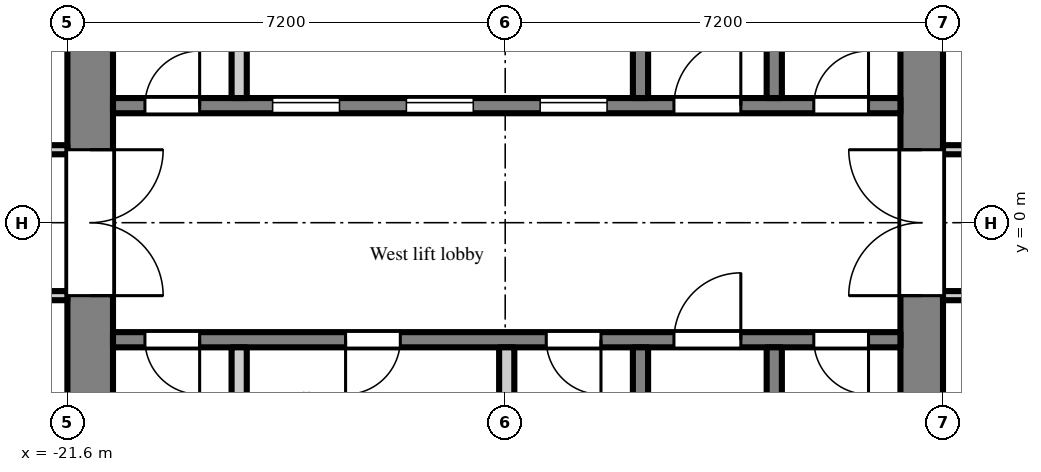
"""IFC4 building model, lengths in metres.
Left out: names, types, materials, properties, quantities, classifications, styles, units other than length and angle.
Written with IfcOpenShell. Run it as: python <this file> out.ifc"""

import sys

from ifc_helpers import new_model, si_unit, direction, frame, frame_2d, origin, place, context, subcontext, project, spatial, polyline, rectangle, outline, extrude, element, fill, save


model = new_model("IFC4")
c1 = context("Model", 3, precision=1e-05, world=origin(), true_north=direction((0.0, 1.0)))
c2 = subcontext(c1, "Body", "Model", "MODEL_VIEW")
j1 = project(units=[si_unit("LENGTHUNIT", "METRE"), si_unit("PLANEANGLEUNIT", "RADIAN")], contexts=[c1])
p1 = place(None, origin())
s1 = spatial("IfcSite", under=j1, at=p1, CompositionType="ELEMENT")
p2 = place(p1, origin())
s2 = spatial("IfcBuilding", under=s1, at=p2, CompositionType="ELEMENT")
p3 = place(p2, frame((0.0, 0.0, 194.7)))
s3 = spatial("IfcBuildingStorey", under=s2, at=p3, CompositionType="ELEMENT", Elevation=194.7)
p4 = place(p3, frame((-7.55, -7.2, 0.0), z_axis=(0.0, 0.0, 1.0), x_axis=(0.0, 1.0, 0.0)))
e1 = element("IfcWall", 1, at=p4, inside=s3, PredefinedType="SHEAR", context=c2, shape_type="SweptSolid", body=[
    extrude(rectangle(XDim=14.4, YDim=0.7, at=frame_2d((7.2, 0.0))), origin(), (0.0, 0.0, 1.0), 3.8),
])
p5 = place(p4, frame((6.0, 0.0, 0.0)))
e2 = element("IfcOpeningElement", 2, at=p5, cuts=e1, PredefinedType="OPENING", context=c2, shape_type="SweptSolid", body=[
    extrude(rectangle(XDim=2.4, YDim=2.2, at=frame_2d((1.2, 1.1))), frame((0.0, 0.36, 0.0), z_axis=(0.0, -1.0, 0.0), x_axis=(1.0, 0.0, 0.0)), (0.0, 0.0, 1.0), 0.72),
])
p6 = place(p3, frame((-21.225, -7.2, 0.0), z_axis=(0.0, 0.0, 1.0), x_axis=(0.0, 1.0, 0.0)))
e3 = element("IfcWall", 3, at=p6, inside=s3, PredefinedType="SHEAR", context=c2, shape_type="SweptSolid", body=[
    extrude(rectangle(XDim=14.4, YDim=0.75, at=frame_2d((7.2, 0.0))), origin(), (0.0, 0.0, 1.0), 3.8),
])
p7 = place(p6, frame((6.0, 0.0, 0.0)))
e4 = element("IfcOpeningElement", 4, at=p7, cuts=e3, PredefinedType="OPENING", context=c2, shape_type="SweptSolid", body=[
    extrude(rectangle(XDim=2.4, YDim=2.2, at=frame_2d((1.2, 1.1))), frame((0.0, 0.385, 0.0), z_axis=(0.0, -1.0, 0.0), x_axis=(1.0, 0.0, 0.0)), (0.0, 0.0, 1.0), 0.77),
])
p8 = place(p3, frame((-7.9, 1.925, 0.0), z_axis=(0.0, 0.0, 1.0), x_axis=(-1.0, 0.0, 0.0)))
e5 = element("IfcWall", 5, at=p8, inside=s3, PredefinedType="SHEAR", context=c2, shape_type="SweptSolid", body=[
    extrude(rectangle(XDim=12.95, YDim=0.25, at=frame_2d((6.475, 0.0))), origin(), (0.0, 0.0, 1.0), 3.8),
])
p9 = place(p8, frame((4.825, 0.0, 0.0)))
e6 = element("IfcOpeningElement", 6, at=p9, cuts=e5, PredefinedType="OPENING", context=c2, shape_type="SweptSolid", body=[
    extrude(rectangle(XDim=1.1, YDim=2.1, at=frame_2d((0.55, 1.05))), frame((0.0, 0.135, 0.0), z_axis=(0.0, -1.0, 0.0), x_axis=(1.0, 0.0, 0.0)), (0.0, 0.0, 1.0), 0.27),
])
p10 = place(p8, frame((7.025, 0.0, 0.0)))
e7 = element("IfcOpeningElement", 7, at=p10, cuts=e5, PredefinedType="OPENING", context=c2, shape_type="SweptSolid", body=[
    extrude(rectangle(XDim=1.1, YDim=2.1, at=frame_2d((0.55, 1.05))), frame((0.0, 0.135, 0.0), z_axis=(0.0, -1.0, 0.0), x_axis=(1.0, 0.0, 0.0)), (0.0, 0.0, 1.0), 0.27),
])
p11 = place(p8, frame((9.225, 0.0, 0.0)))
e8 = element("IfcOpeningElement", 8, at=p11, cuts=e5, PredefinedType="OPENING", context=c2, shape_type="SweptSolid", body=[
    extrude(rectangle(XDim=1.1, YDim=2.1, at=frame_2d((0.55, 1.05))), frame((0.0, 0.135, 0.0), z_axis=(0.0, -1.0, 0.0), x_axis=(1.0, 0.0, 0.0)), (0.0, 0.0, 1.0), 0.27),
])
p12 = place(p8, frame((0.525, 0.0, 0.0)))
e9 = element("IfcOpeningElement", 9, at=p12, cuts=e5, PredefinedType="OPENING", context=c2, shape_type="SweptSolid", body=[
    extrude(rectangle(XDim=0.9, YDim=2.1, at=frame_2d((0.45, 1.05))), frame((0.0, 0.135, 0.0), z_axis=(0.0, -1.0, 0.0), x_axis=(1.0, 0.0, 0.0)), (0.0, 0.0, 1.0), 0.27),
])
p13 = place(p8, frame((2.625, 0.0, 0.0)))
e10 = element("IfcOpeningElement", 10, at=p13, cuts=e5, PredefinedType="OPENING", context=c2, shape_type="SweptSolid", body=[
    extrude(rectangle(XDim=1.1, YDim=2.1, at=frame_2d((0.55, 1.05))), frame((0.0, 0.135, 0.0), z_axis=(0.0, -1.0, 0.0), x_axis=(1.0, 0.0, 0.0)), (0.0, 0.0, 1.0), 0.27),
])
p14 = place(p8, frame((11.525, 0.0, 0.0)))
e11 = element("IfcOpeningElement", 11, at=p14, cuts=e5, PredefinedType="OPENING", context=c2, shape_type="SweptSolid", body=[
    extrude(rectangle(XDim=0.9, YDim=2.1, at=frame_2d((0.45, 1.05))), frame((0.0, 0.135, 0.0), z_axis=(0.0, -1.0, 0.0), x_axis=(1.0, 0.0, 0.0)), (0.0, 0.0, 1.0), 0.27),
])
p15 = place(p3, frame((-9.975, 2.05, 0.0), z_axis=(0.0, 0.0, 1.0), x_axis=(0.0, 1.0, 0.0)))
e12 = element("IfcWall", 12, at=p15, inside=s3, PredefinedType="SHEAR", context=c2, shape_type="SweptSolid", body=[
    extrude(rectangle(XDim=4.75, YDim=0.25, at=frame_2d((2.375, 0.0))), origin(), (0.0, 0.0, 1.0), 3.8),
])
p16 = place(p15, frame((2.95, 0.0, 0.0)))
e13 = element("IfcOpeningElement", 13, at=p16, cuts=e12, PredefinedType="OPENING", context=c2, shape_type="SweptSolid", body=[
    extrude(rectangle(XDim=1.1, YDim=2.1, at=frame_2d((0.55, 1.05))), frame((0.0, 0.135, 0.0), z_axis=(0.0, -1.0, 0.0), x_axis=(1.0, 0.0, 0.0)), (0.0, 0.0, 1.0), 0.27),
])
p17 = place(p3, frame((-12.175, 2.05, 0.0), z_axis=(0.0, 0.0, 1.0), x_axis=(0.0, 1.0, 0.0)))
e14 = element("IfcWall", 14, at=p17, inside=s3, PredefinedType="SHEAR", context=c2, shape_type="SweptSolid", body=[
    extrude(rectangle(XDim=4.75, YDim=0.25, at=frame_2d((2.375, 0.0))), origin(), (0.0, 0.0, 1.0), 3.8),
])
p18 = place(p17, frame((3.0, 0.0, 0.0)))
e15 = element("IfcOpeningElement", 15, at=p18, cuts=e14, PredefinedType="OPENING", context=c2, shape_type="SweptSolid", body=[
    extrude(rectangle(XDim=1.1, YDim=2.1, at=frame_2d((0.55, 1.05))), frame((0.0, 0.135, 0.0), z_axis=(0.0, -1.0, 0.0), x_axis=(1.0, 0.0, 0.0)), (0.0, 0.0, 1.0), 0.27),
])
p19 = place(p3, frame((-18.775, 2.05, 0.0), z_axis=(0.0, 0.0, 1.0), x_axis=(0.0, 1.0, 0.0)))
e16 = element("IfcWall", 16, at=p19, inside=s3, PredefinedType="PARTITIONING", context=c2, shape_type="SweptSolid", body=[
    extrude(rectangle(XDim=2.1, YDim=0.25, at=frame_2d((1.05, 0.0))), origin(), (0.0, 0.0, 1.0), 3.8),
])
p20 = place(p3, frame((-7.9, -1.925, 0.0), z_axis=(0.0, 0.0, 1.0), x_axis=(-1.0, 0.0, 0.0)))
e17 = element("IfcWall", 17, at=p20, inside=s3, PredefinedType="SHEAR", context=c2, shape_type="SweptSolid", body=[
    extrude(rectangle(XDim=12.95, YDim=0.25, at=frame_2d((6.475, 0.0))), origin(), (0.0, 0.0, 1.0), 3.8),
])
p21 = place(p20, frame((0.525, 0.0, 0.0)))
e18 = element("IfcOpeningElement", 18, at=p21, cuts=e17, PredefinedType="OPENING", context=c2, shape_type="SweptSolid", body=[
    extrude(rectangle(XDim=0.9, YDim=2.1, at=frame_2d((0.45, 1.05))), frame((0.0, 0.135, 0.0), z_axis=(0.0, -1.0, 0.0), x_axis=(1.0, 0.0, 0.0)), (0.0, 0.0, 1.0), 0.27),
])
p22 = place(p20, frame((2.625, 0.0, 0.0)))
e19 = element("IfcOpeningElement", 19, at=p22, cuts=e17, PredefinedType="OPENING", context=c2, shape_type="SweptSolid", body=[
    extrude(rectangle(XDim=1.1, YDim=2.1, at=frame_2d((0.55, 1.05))), frame((0.0, 0.135, 0.0), z_axis=(0.0, -1.0, 0.0), x_axis=(1.0, 0.0, 0.0)), (0.0, 0.0, 1.0), 0.27),
])
p23 = place(p20, frame((4.925, 0.0, 0.0)))
e20 = element("IfcOpeningElement", 20, at=p23, cuts=e17, PredefinedType="OPENING", context=c2, shape_type="SweptSolid", body=[
    extrude(rectangle(XDim=0.9, YDim=2.1, at=frame_2d((0.45, 1.05))), frame((0.0, 0.135, 0.0), z_axis=(0.0, -1.0, 0.0), x_axis=(1.0, 0.0, 0.0)), (0.0, 0.0, 1.0), 0.27),
])
p24 = place(p20, frame((8.225, 0.0, 0.0)))
e21 = element("IfcOpeningElement", 21, at=p24, cuts=e17, PredefinedType="OPENING", context=c2, shape_type="SweptSolid", body=[
    extrude(rectangle(XDim=0.9, YDim=2.1, at=frame_2d((0.45, 1.05))), frame((0.0, 0.135, 0.0), z_axis=(0.0, -1.0, 0.0), x_axis=(1.0, 0.0, 0.0)), (0.0, 0.0, 1.0), 0.27),
])
p25 = place(p20, frame((11.525, 0.0, 0.0)))
e22 = element("IfcOpeningElement", 22, at=p25, cuts=e17, PredefinedType="OPENING", context=c2, shape_type="SweptSolid", body=[
    extrude(rectangle(XDim=0.9, YDim=2.1, at=frame_2d((0.45, 1.05))), frame((0.0, 0.135, 0.0), z_axis=(0.0, -1.0, 0.0), x_axis=(1.0, 0.0, 0.0)), (0.0, 0.0, 1.0), 0.27),
])
p26 = place(p3, frame((-9.975, -2.05, 0.0), z_axis=(0.0, 0.0, 1.0), x_axis=(0.0, -1.0, 0.0)))
e23 = element("IfcWall", 23, at=p26, inside=s3, PredefinedType="SHEAR", context=c2, shape_type="SweptSolid", body=[
    extrude(rectangle(XDim=4.75, YDim=0.25, at=frame_2d((2.375, 0.0))), origin(), (0.0, 0.0, 1.0), 3.8),
])
p27 = place(p26, frame((2.95, 0.0, 0.0)))
e24 = element("IfcOpeningElement", 24, at=p27, cuts=e23, PredefinedType="OPENING", context=c2, shape_type="SweptSolid", body=[
    extrude(rectangle(XDim=1.1, YDim=2.1, at=frame_2d((0.55, 1.05))), frame((0.0, 0.135, 0.0), z_axis=(0.0, -1.0, 0.0), x_axis=(1.0, 0.0, 0.0)), (0.0, 0.0, 1.0), 0.27),
])
p28 = place(p3, frame((-12.175, -2.05, 0.0), z_axis=(0.0, 0.0, 1.0), x_axis=(0.0, -1.0, 0.0)))
e25 = element("IfcWall", 25, at=p28, inside=s3, PredefinedType="SHEAR", context=c2, shape_type="SweptSolid", body=[
    extrude(rectangle(XDim=4.75, YDim=0.25, at=frame_2d((2.375, 0.0))), origin(), (0.0, 0.0, 1.0), 3.8),
])
p29 = place(p28, frame((3.0, 0.0, 0.0)))
e26 = element("IfcOpeningElement", 26, at=p29, cuts=e25, PredefinedType="OPENING", context=c2, shape_type="SweptSolid", body=[
    extrude(rectangle(XDim=1.1, YDim=2.1, at=frame_2d((0.55, 1.05))), frame((0.0, 0.135, 0.0), z_axis=(0.0, -1.0, 0.0), x_axis=(1.0, 0.0, 0.0)), (0.0, 0.0, 1.0), 0.27),
])
for number, where, z_axis, x_axis in (
    (27, (-14.375, -2.05, 0.0), (0.0, 0.0, 1.0), (0.0, -1.0, 0.0)),
    (28, (-18.775, -2.05, 0.0), (0.0, 0.0, 1.0), (0.0, -1.0, 0.0)),
):
    element("IfcWall", number, at=place(p3, frame(where, z_axis=z_axis, x_axis=x_axis)), inside=s3, PredefinedType="PARTITIONING", context=c2, shape_type="SweptSolid", body=[
        extrude(rectangle(XDim=2.1, YDim=0.25, at=frame_2d((1.05, 0.0))), origin(), (0.0, 0.0, 1.0), 3.8),
    ])
p30 = place(p3, frame((-36.5, -1.2, 0.0), z_axis=(0.0, 0.0, 1.0), x_axis=(1.0, 0.0, 0.0)))
e29 = element("IfcWall", 29, at=p30, inside=s3, PredefinedType="PARTITIONING", context=c2, shape_type="SweptSolid", body=[
    extrude(outline(polyline([(0.0, 0.0), (14.9, 0.0), (14.9, 3.8), (6.102, 3.8), (6.1, 3.4), (5.3, 3.4), (5.298, 3.8), (0.0, 3.8), (0.0, 0.0)])), frame((0.0, 0.075, 0.0), z_axis=(0.0, -1.0, 0.0), x_axis=(1.0, 0.0, 0.0)), (0.0, 0.0, 1.0), 0.15),
])
p31 = place(p30, frame((6.8, 0.0, 0.0)))
e30 = element("IfcOpeningElement", 30, at=p31, cuts=e29, PredefinedType="OPENING", context=c2, shape_type="SweptSolid", body=[
    extrude(rectangle(XDim=1.8, YDim=2.1, at=frame_2d((0.9, 1.05))), frame((0.0, 0.085, 0.0), z_axis=(0.0, -1.0, 0.0), x_axis=(1.0, 0.0, 0.0)), (0.0, 0.0, 1.0), 0.17),
])
p32 = place(p30, frame((12.45, 0.0, 0.0)))
e31 = element("IfcOpeningElement", 31, at=p32, cuts=e29, PredefinedType="OPENING", context=c2, shape_type="SweptSolid", body=[
    extrude(rectangle(XDim=1.8, YDim=2.1, at=frame_2d((0.9, 1.05))), frame((0.0, 0.085, 0.0), z_axis=(0.0, -1.0, 0.0), x_axis=(1.0, 0.0, 0.0)), (0.0, 0.0, 1.0), 0.17),
])
p33 = place(p30, frame((1.15, 0.0, 0.0)))
e32 = element("IfcOpeningElement", 32, at=p33, cuts=e29, PredefinedType="OPENING", context=c2, shape_type="SweptSolid", body=[
    extrude(rectangle(XDim=1.8, YDim=2.1, at=frame_2d((0.9, 1.05))), frame((0.0, 0.085, 0.0), z_axis=(0.0, -1.0, 0.0), x_axis=(1.0, 0.0, 0.0)), (0.0, 0.0, 1.0), 0.17),
])
p34 = place(p3, frame((-36.5, 1.2, 0.0), z_axis=(0.0, 0.0, 1.0), x_axis=(1.0, 0.0, 0.0)))
e33 = element("IfcWall", 33, at=p34, inside=s3, PredefinedType="PARTITIONING", context=c2, shape_type="SweptSolid", body=[
    extrude(outline(polyline([(0.0, 0.0), (14.9, 0.0), (14.9, 3.8), (6.102, 3.8), (6.1, 3.4), (5.3, 3.4), (5.298, 3.8), (0.0, 3.8), (0.0, 0.0)])), frame((0.0, 0.075, 0.0), z_axis=(0.0, -1.0, 0.0), x_axis=(1.0, 0.0, 0.0)), (0.0, 0.0, 1.0), 0.15),
])
p35 = place(p34, frame((8.6, 0.0, 0.0)))
e34 = element("IfcOpeningElement", 34, at=p35, cuts=e33, PredefinedType="OPENING", context=c2, shape_type="SweptSolid", body=[
    extrude(rectangle(XDim=1.8, YDim=2.1, at=frame_2d((0.9, 1.05))), frame((0.0, 0.085, 0.0), z_axis=(0.0, -1.0, 0.0), x_axis=(1.0, 0.0, 0.0)), (0.0, 0.0, 1.0), 0.17),
])
p36 = place(p34, frame((12.85, 0.0, 0.0)))
e35 = element("IfcOpeningElement", 35, at=p36, cuts=e33, PredefinedType="OPENING", context=c2, shape_type="SweptSolid", body=[
    extrude(rectangle(XDim=1.2, YDim=2.1, at=frame_2d((0.6, 1.05))), frame((0.0, 0.085, 0.0), z_axis=(0.0, -1.0, 0.0), x_axis=(1.0, 0.0, 0.0)), (0.0, 0.0, 1.0), 0.17),
])
p37 = place(p34, frame((3.25, 0.0, 0.0)))
e36 = element("IfcOpeningElement", 36, at=p37, cuts=e33, PredefinedType="OPENING", context=c2, shape_type="SweptSolid", body=[
    extrude(rectangle(XDim=1.2, YDim=2.1, at=frame_2d((0.6, 1.05))), frame((0.0, 0.085, 0.0), z_axis=(0.0, -1.0, 0.0), x_axis=(1.0, 0.0, 0.0)), (0.0, 0.0, 1.0), 0.17),
])
p38 = place(p3, frame((-7.2, -1.2, 0.0), z_axis=(0.0, 0.0, 1.0), x_axis=(1.0, 0.0, 0.0)))
e37 = element("IfcWall", 37, at=p38, inside=s3, PredefinedType="PARTITIONING", context=c2, shape_type="SweptSolid", body=[
    extrude(rectangle(XDim=5.925, YDim=0.15, at=frame_2d((2.962, 0.0))), origin(), (0.0, 0.0, 1.0), 3.8),
])
p39 = place(p38, frame((0.85, 0.0, 0.0)))
e38 = element("IfcOpeningElement", 38, at=p39, cuts=e37, PredefinedType="OPENING", context=c2, shape_type="SweptSolid", body=[
    extrude(rectangle(XDim=1.2, YDim=2.1, at=frame_2d((0.6, 1.05))), frame((0.0, 0.085, 0.0), z_axis=(0.0, -1.0, 0.0), x_axis=(1.0, 0.0, 0.0)), (0.0, 0.0, 1.0), 0.17),
])
p40 = place(p3, frame((-7.2, 1.2, 0.0), z_axis=(0.0, 0.0, 1.0), x_axis=(1.0, 0.0, 0.0)))
e39 = element("IfcWall", 39, at=p40, inside=s3, PredefinedType="PARTITIONING", context=c2, shape_type="SweptSolid", body=[
    extrude(rectangle(XDim=5.925, YDim=0.15, at=frame_2d((2.962, 0.0))), origin(), (0.0, 0.0, 1.0), 3.8),
])
p41 = place(p40, frame((0.65, 0.0, 0.0)))
e40 = element("IfcOpeningElement", 40, at=p41, cuts=e39, PredefinedType="OPENING", context=c2, shape_type="SweptSolid", body=[
    extrude(rectangle(XDim=1.2, YDim=2.1, at=frame_2d((0.6, 1.05))), frame((0.0, 0.085, 0.0), z_axis=(0.0, -1.0, 0.0), x_axis=(1.0, 0.0, 0.0)), (0.0, 0.0, 1.0), 0.17),
])
p42 = place(p40, frame((4.925, 0.0, 0.0)))
e41 = element("IfcOpeningElement", 41, at=p42, cuts=e39, PredefinedType="OPENING", context=c2, shape_type="SweptSolid", body=[
    extrude(rectangle(XDim=0.9, YDim=2.1, at=frame_2d((0.45, 1.05))), frame((0.0, 0.085, 0.0), z_axis=(0.0, -1.0, 0.0), x_axis=(1.0, 0.0, 0.0)), (0.0, 0.0, 1.0), 0.17),
])
p43 = place(p9, origin())
e42 = element("IfcDoor", 42, at=p43, inside=s3, OperationType="SLIDING_TO_LEFT", PredefinedType="DOOR", context=c2, shape_type="SweptSolid", body=[
    extrude(rectangle(XDim=1.1, YDim=2.1, at=frame_2d((0.55, 1.05))), frame((0.0, 0.025, 0.0), z_axis=(0.0, -1.0, 0.0), x_axis=(1.0, 0.0, 0.0)), (0.0, 0.0, 1.0), 0.05),
])
fill(e6, e42)
p44 = place(p10, origin())
e43 = element("IfcDoor", 43, at=p44, inside=s3, OperationType="SLIDING_TO_LEFT", PredefinedType="DOOR", context=c2, shape_type="SweptSolid", body=[
    extrude(rectangle(XDim=1.1, YDim=2.1, at=frame_2d((0.55, 1.05))), frame((0.0, 0.025, 0.0), z_axis=(0.0, -1.0, 0.0), x_axis=(1.0, 0.0, 0.0)), (0.0, 0.0, 1.0), 0.05),
])
fill(e7, e43)
p45 = place(p11, origin())
e44 = element("IfcDoor", 44, at=p45, inside=s3, OperationType="SLIDING_TO_LEFT", PredefinedType="DOOR", context=c2, shape_type="SweptSolid", body=[
    extrude(rectangle(XDim=1.1, YDim=2.1, at=frame_2d((0.55, 1.05))), frame((0.0, 0.025, 0.0), z_axis=(0.0, -1.0, 0.0), x_axis=(1.0, 0.0, 0.0)), (0.0, 0.0, 1.0), 0.05),
])
fill(e8, e44)
p46 = place(p12, frame((0.9, 0.0, 0.0), z_axis=(0.0, 0.0, 1.0), x_axis=(-1.0, 0.0, 0.0)))
e45 = element("IfcDoor", 45, at=p46, inside=s3, OperationType="SINGLE_SWING_RIGHT", PredefinedType="DOOR", context=c2, shape_type="SweptSolid", body=[
    extrude(rectangle(XDim=0.9, YDim=2.1, at=frame_2d((0.45, 1.05))), frame((0.0, 0.025, 0.0), z_axis=(0.0, -1.0, 0.0), x_axis=(1.0, 0.0, 0.0)), (0.0, 0.0, 1.0), 0.05),
])
fill(e9, e45)
p47 = place(p21, origin())
e46 = element("IfcDoor", 46, at=p47, inside=s3, OperationType="SINGLE_SWING_LEFT", PredefinedType="DOOR", context=c2, shape_type="SweptSolid", body=[
    extrude(rectangle(XDim=0.9, YDim=2.1, at=frame_2d((0.45, 1.05))), frame((0.0, 0.025, 0.0), z_axis=(0.0, -1.0, 0.0), x_axis=(1.0, 0.0, 0.0)), (0.0, 0.0, 1.0), 0.05),
])
fill(e18, e46)
p48 = place(p13, frame((1.1, 0.0, 0.0), z_axis=(0.0, 0.0, 1.0), x_axis=(-1.0, 0.0, 0.0)))
e47 = element("IfcDoor", 47, at=p48, inside=s3, OperationType="SINGLE_SWING_RIGHT", PredefinedType="DOOR", context=c2, shape_type="SweptSolid", body=[
    extrude(rectangle(XDim=1.1, YDim=2.1, at=frame_2d((0.55, 1.05))), frame((0.0, 0.025, 0.0), z_axis=(0.0, -1.0, 0.0), x_axis=(1.0, 0.0, 0.0)), (0.0, 0.0, 1.0), 0.05),
])
fill(e10, e47)
p49 = place(p22, frame((1.1, 0.0, 0.0), z_axis=(0.0, 0.0, 1.0), x_axis=(-1.0, 0.0, 0.0)))
e48 = element("IfcDoor", 48, at=p49, inside=s3, OperationType="SINGLE_SWING_RIGHT", PredefinedType="DOOR", context=c2, shape_type="SweptSolid", body=[
    extrude(rectangle(XDim=1.1, YDim=2.1, at=frame_2d((0.55, 1.05))), frame((0.0, 0.025, 0.0), z_axis=(0.0, -1.0, 0.0), x_axis=(1.0, 0.0, 0.0)), (0.0, 0.0, 1.0), 0.05),
])
fill(e19, e48)
p50 = place(p5, origin())
e49 = element("IfcDoor", 49, at=p50, inside=s3, OperationType="DOUBLE_DOOR_DOUBLE_SWING", PredefinedType="DOOR", context=c2, shape_type="SweptSolid", body=[
    extrude(rectangle(XDim=2.4, YDim=2.2, at=frame_2d((1.2, 1.1))), frame((0.0, 0.025, 0.0), z_axis=(0.0, -1.0, 0.0), x_axis=(1.0, 0.0, 0.0)), (0.0, 0.0, 1.0), 0.05),
])
fill(e2, e49)
p51 = place(p7, frame((2.4, 0.0, 0.0), z_axis=(0.0, 0.0, 1.0), x_axis=(-1.0, 0.0, 0.0)))
e50 = element("IfcDoor", 50, at=p51, inside=s3, OperationType="DOUBLE_DOOR_DOUBLE_SWING", PredefinedType="DOOR", context=c2, shape_type="SweptSolid", body=[
    extrude(rectangle(XDim=2.4, YDim=2.2, at=frame_2d((1.2, 1.1))), frame((0.0, 0.025, 0.0), z_axis=(0.0, -1.0, 0.0), x_axis=(1.0, 0.0, 0.0)), (0.0, 0.0, 1.0), 0.05),
])
fill(e4, e50)
p52 = place(p14, frame((0.9, 0.0, 0.0), z_axis=(0.0, 0.0, 1.0), x_axis=(-1.0, 0.0, 0.0)))
e51 = element("IfcDoor", 51, at=p52, inside=s3, OperationType="SINGLE_SWING_RIGHT", PredefinedType="DOOR", context=c2, shape_type="SweptSolid", body=[
    extrude(rectangle(XDim=0.9, YDim=2.1, at=frame_2d((0.45, 1.05))), frame((0.0, 0.025, 0.0), z_axis=(0.0, -1.0, 0.0), x_axis=(1.0, 0.0, 0.0)), (0.0, 0.0, 1.0), 0.05),
])
fill(e11, e51)
p53 = place(p23, origin())
e52 = element("IfcDoor", 52, at=p53, inside=s3, OperationType="SINGLE_SWING_LEFT", PredefinedType="DOOR", context=c2, shape_type="SweptSolid", body=[
    extrude(rectangle(XDim=0.9, YDim=2.1, at=frame_2d((0.45, 1.05))), frame((0.0, 0.025, 0.0), z_axis=(0.0, -1.0, 0.0), x_axis=(1.0, 0.0, 0.0)), (0.0, 0.0, 1.0), 0.05),
])
fill(e20, e52)
p54 = place(p24, origin())
e53 = element("IfcDoor", 53, at=p54, inside=s3, OperationType="SINGLE_SWING_RIGHT", PredefinedType="DOOR", context=c2, shape_type="SweptSolid", body=[
    extrude(rectangle(XDim=0.9, YDim=2.1, at=frame_2d((0.45, 1.05))), frame((0.0, 0.025, 0.0), z_axis=(0.0, -1.0, 0.0), x_axis=(1.0, 0.0, 0.0)), (0.0, 0.0, 1.0), 0.05),
])
fill(e21, e53)
p55 = place(p25, origin())
e54 = element("IfcDoor", 54, at=p55, inside=s3, OperationType="SINGLE_SWING_LEFT", PredefinedType="DOOR", context=c2, shape_type="SweptSolid", body=[
    extrude(rectangle(XDim=0.9, YDim=2.1, at=frame_2d((0.45, 1.05))), frame((0.0, 0.025, 0.0), z_axis=(0.0, -1.0, 0.0), x_axis=(1.0, 0.0, 0.0)), (0.0, 0.0, 1.0), 0.05),
])
fill(e22, e54)
save(model, sys.argv[1])
